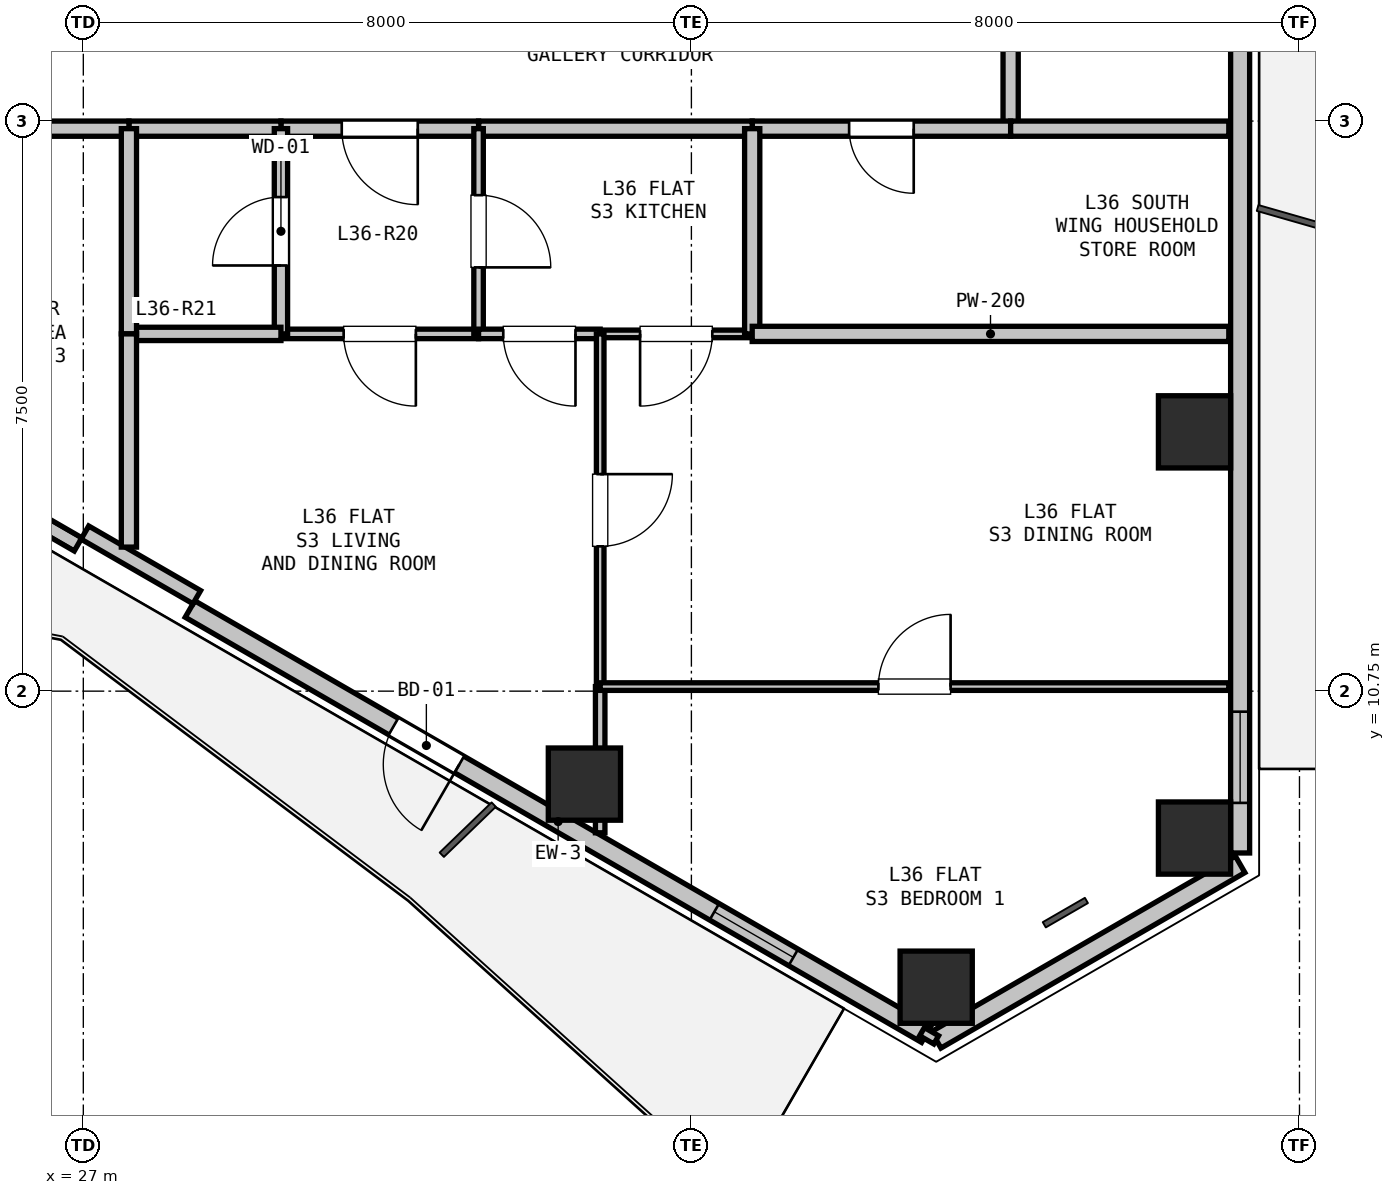
"""IFC4 building model, lengths in metres.
Left out: names, types, materials, properties, quantities, classifications, styles, units other than length and angle.
Written with IfcOpenShell. Run it as: python <this file> out.ifc"""

import sys

from ifc_helpers import new_model, si_unit, direction, frame, frame_2d, origin, origin_2d, place, context, subcontext, project, spatial, rectangle, hollow_rectangle, extrude, element, fill, save


model = new_model("IFC4")
c1 = context("Model", 3, precision=1e-05, world=origin(), true_north=direction((0.0, 1.0)))
c2 = subcontext(c1, "Body", "Model", "MODEL_VIEW")
j1 = project(units=[si_unit("LENGTHUNIT", "METRE"), si_unit("PLANEANGLEUNIT", "RADIAN")], contexts=[c1])
p1 = place(None, origin())
s1 = spatial("IfcSite", under=j1, at=p1, CompositionType="ELEMENT")
p2 = place(p1, origin())
s2 = spatial("IfcBuilding", under=s1, at=p2, CompositionType="ELEMENT")
p3 = place(p2, frame((0.0, 0.0, 131.1)))
s3 = spatial("IfcBuildingStorey", under=s2, at=p3, CompositionType="ELEMENT", Elevation=131.1)
for number, where, z_axis, x_axis in (
    (1, (41.619, 14.161, 0.0), (0.0, 0.0, 1.0), (1.0, 0.0, 0.0)),
    (2, (41.619, 8.817, 0.0), (0.0, 0.0, 1.0), (1.0, 0.0, 0.0)),
    (3, (38.22, 6.855, 0.0), (0.0, 0.0, 1.0), (1.0, 0.0, 0.0)),
    (4, (33.593, 9.527, 0.0), (0.0, 0.0, 1.0), (1.0, 0.0, 0.0)),
):
    element("IfcColumn", number, at=place(p3, frame(where, z_axis=z_axis, x_axis=x_axis)), inside=s3, PredefinedType="COLUMN", context=c2, shape_type="SweptSolid", body=[
        extrude(hollow_rectangle(XDim=0.95, YDim=0.95, WallThickness=0.028, at=origin_2d()), origin(), (0.0, 0.0, 1.0), 3.3),
    ])
p4 = place(p3, frame((42.219, 8.471, 0.0), z_axis=(0.0, 0.0, 1.0), x_axis=(-0.866035021055, -0.499983342029, 0.0)))
e5 = element("IfcWall", 5, at=p4, inside=s3, PredefinedType="SOLIDWALL", context=c2, shape_type="SweptSolid", body=[
    extrude(rectangle(XDim=4.617, YDim=0.25, at=frame_2d((2.309, 0.0))), origin(), (0.0, 0.0, 1.0), 2.68),
])
p5 = place(p3, frame((42.219, 19.807, 0.0), z_axis=(0.0, 0.0, 1.0), x_axis=(0.0, -1.0, 0.0)))
e6 = element("IfcWall", 6, at=p5, inside=s3, PredefinedType="SOLIDWALL", context=c2, shape_type="SweptSolid", body=[
    extrude(rectangle(XDim=11.186, YDim=0.25, at=frame_2d((5.593, 0.0))), origin(), (0.0, 0.0, 1.0), 2.68),
])
p6 = place(p5, frame((9.327, 0.0, 0.9)))
e7 = element("IfcOpeningElement", 7, at=p6, cuts=e6, PredefinedType="OPENING", context=c2, shape_type="SweptSolid", body=[
    extrude(rectangle(XDim=1.2, YDim=1.4, at=frame_2d((0.6, 0.7))), frame((0.0, 0.135, 0.0), z_axis=(0.0, -1.0, 0.0), x_axis=(1.0, 0.0, 0.0)), (0.0, 0.0, 1.0), 0.27),
])
p7 = place(p3, frame((38.091, 6.237, 0.0), z_axis=(0.0, 0.0, 1.0), x_axis=(-0.86602239209, 0.500005216371, 0.0)))
e8 = element("IfcWall", 8, at=p7, inside=s3, PredefinedType="SOLIDWALL", context=c2, shape_type="SweptSolid", body=[
    extrude(rectangle(XDim=11.186, YDim=0.25, at=frame_2d((5.593, 0.0))), origin(), (0.0, 0.0, 1.0), 2.68),
])
p8 = place(p7, frame((7.095, 0.0, 0.0)))
e9 = element("IfcOpeningElement", 9, at=p8, cuts=e8, PredefinedType="OPENING", context=c2, shape_type="SweptSolid", body=[
    extrude(rectangle(XDim=1.0, YDim=2.1, at=frame_2d((0.5, 1.05))), frame((0.0, 0.135, 0.0), z_axis=(0.0, -1.0, 0.0), x_axis=(1.0, 0.0, 0.0)), (0.0, 0.0, 1.0), 0.27),
])
p9 = place(p7, frame((2.02, 0.0, 0.9)))
e10 = element("IfcOpeningElement", 10, at=p9, cuts=e8, PredefinedType="OPENING", context=c2, shape_type="SweptSolid", body=[
    extrude(rectangle(XDim=1.2, YDim=1.4, at=frame_2d((0.6, 0.7))), frame((0.0, 0.135, 0.0), z_axis=(0.0, -1.0, 0.0), x_axis=(1.0, 0.0, 0.0)), (0.0, 0.0, 1.0), 0.27),
])
p10 = place(p3, frame((26.931, 12.68, 0.0), z_axis=(0.0, 0.0, 1.0), x_axis=(-0.866026619769, 0.499997893847, 0.0)))
e11 = element("IfcWall", 11, at=p10, inside=s3, PredefinedType="PARAPET", context=c2, shape_type="SweptSolid", body=[
    extrude(rectangle(XDim=10.486, YDim=0.2, at=frame_2d((5.243, 0.0))), origin(), (0.0, 0.0, 1.0), 0.2),
])
p11 = place(p3, frame((28.493, 11.986, 0.0), z_axis=(0.0, 0.0, 1.0), x_axis=(-0.86605165483, 0.499954529098, 0.0)))
e12 = element("IfcWall", 12, at=p11, inside=s3, PredefinedType="PARAPET", context=c2, shape_type="SweptSolid", body=[
    extrude(rectangle(XDim=1.7, YDim=0.2, at=frame_2d((0.85, 0.0))), origin(), (0.0, 0.0, 1.0), 2.68),
])
p12 = place(p3, frame((39.2, 19.9, 0.0), z_axis=(0.0, 0.0, 1.0), x_axis=(0.0, -1.0, 0.0)))
e13 = element("IfcWall", 13, at=p12, inside=s3, PredefinedType="PARTITIONING", context=c2, shape_type="SweptSolid", body=[
    extrude(rectangle(XDim=1.75, YDim=0.2, at=frame_2d((0.875, 0.0))), origin(), (0.0, 0.0, 1.0), 3.06),
])
p13 = place(p3, frame((39.2, 18.15, 0.0), z_axis=(0.0, 0.0, 1.0), x_axis=(-1.0, 0.0, 0.0)))
e14 = element("IfcWall", 14, at=p13, inside=s3, PredefinedType="PARTITIONING", context=c2, shape_type="SweptSolid", body=[
    extrude(rectangle(XDim=3.4, YDim=0.2, at=frame_2d((1.7, 0.0))), origin(), (0.0, 0.0, 1.0), 2.433),
])
p14 = place(p13, frame((1.275, 0.0, 0.0)))
e15 = element("IfcOpeningElement", 15, at=p14, cuts=e14, PredefinedType="OPENING", context=c2, shape_type="SweptSolid", body=[
    extrude(rectangle(XDim=0.85, YDim=2.1, at=frame_2d((0.425, 1.05))), frame((0.0, 0.11, 0.0), z_axis=(0.0, -1.0, 0.0), x_axis=(1.0, 0.0, 0.0)), (0.0, 0.0, 1.0), 0.22),
])
p15 = place(p3, frame((35.8, 18.15, 0.0), z_axis=(0.0, 0.0, 1.0), x_axis=(-1.0, 0.0, 0.0)))
e16 = element("IfcWall", 16, at=p15, inside=s3, PredefinedType="PARTITIONING", context=c2, shape_type="SweptSolid", body=[
    extrude(rectangle(XDim=3.6, YDim=0.2, at=frame_2d((1.8, 0.0))), origin(), (0.0, 0.0, 1.0), 3.06),
])
p16 = place(p3, frame((32.2, 18.15, 0.0), z_axis=(0.0, 0.0, 1.0), x_axis=(-1.0, 0.0, 0.0)))
e17 = element("IfcWall", 17, at=p16, inside=s3, PredefinedType="PARTITIONING", context=c2, shape_type="SweptSolid", body=[
    extrude(rectangle(XDim=2.6, YDim=0.2, at=frame_2d((1.3, 0.0))), origin(), (0.0, 0.0, 1.0), 3.06),
])
p17 = place(p16, frame((0.8, 0.0, 0.0)))
e18 = element("IfcOpeningElement", 18, at=p17, cuts=e17, PredefinedType="OPENING", context=c2, shape_type="SweptSolid", body=[
    extrude(rectangle(XDim=1.0, YDim=2.15, at=frame_2d((0.5, 1.075))), frame((0.0, 0.11, 0.0), z_axis=(0.0, -1.0, 0.0), x_axis=(1.0, 0.0, 0.0)), (0.0, 0.0, 1.0), 0.22),
])
p18 = place(p3, frame((29.6, 18.15, 0.0), z_axis=(0.0, 0.0, 1.0), x_axis=(-1.0, 0.0, 0.0)))
e19 = element("IfcWall", 19, at=p18, inside=s3, PredefinedType="PARTITIONING", context=c2, shape_type="SweptSolid", body=[
    extrude(rectangle(XDim=2.0, YDim=0.2, at=frame_2d((1.0, 0.0))), origin(), (0.0, 0.0, 1.0), 3.06),
])
p19 = place(p3, frame((27.6, 18.15, 0.0), z_axis=(0.0, 0.0, 1.0), x_axis=(-1.0, 0.0, 0.0)))
e20 = element("IfcWall", 20, at=p19, inside=s3, PredefinedType="PARTITIONING", context=c2, shape_type="SweptSolid", body=[
    extrude(rectangle(XDim=3.2, YDim=0.2, at=frame_2d((1.6, 0.0))), origin(), (0.0, 0.0, 1.0), 2.433),
])
p20 = place(p19, frame((1.1, 0.0, 0.0)))
e21 = element("IfcOpeningElement", 21, at=p20, cuts=e20, PredefinedType="OPENING", context=c2, shape_type="SweptSolid", body=[
    extrude(rectangle(XDim=1.0, YDim=2.15, at=frame_2d((0.5, 1.075))), frame((0.0, 0.11, 0.0), z_axis=(0.0, -1.0, 0.0), x_axis=(1.0, 0.0, 0.0)), (0.0, 0.0, 1.0), 0.22),
])
p21 = place(p3, frame((32.2, 15.45, 0.0), z_axis=(0.0, 0.0, 1.0), x_axis=(-1.0, 0.0, 0.0)))
e22 = element("IfcWall", 22, at=p21, inside=s3, PredefinedType="PARTITIONING", context=c2, shape_type="SweptSolid", body=[
    extrude(rectangle(XDim=2.6, YDim=0.125, at=frame_2d((1.3, 0.0))), origin(), (0.0, 0.0, 1.0), 3.06),
])
p22 = place(p21, frame((0.825, 0.0, 0.0)))
e23 = element("IfcOpeningElement", 23, at=p22, cuts=e22, PredefinedType="OPENING", context=c2, shape_type="SweptSolid", body=[
    extrude(rectangle(XDim=0.95, YDim=2.1, at=frame_2d((0.475, 1.05))), frame((0.0, 0.073, 0.0), z_axis=(0.0, -1.0, 0.0), x_axis=(1.0, 0.0, 0.0)), (0.0, 0.0, 1.0), 0.145),
])
p23 = place(p3, frame((29.6, 15.45, 0.0), z_axis=(0.0, 0.0, 1.0), x_axis=(0.0, 1.0, 0.0)))
e24 = element("IfcWall", 24, at=p23, inside=s3, PredefinedType="PLUMBINGWALL", context=c2, shape_type="SweptSolid", body=[
    extrude(rectangle(XDim=2.7, YDim=0.175, at=frame_2d((1.35, 0.0))), origin(), (0.0, 0.0, 1.0), 3.06),
])
p24 = place(p23, frame((0.9, 0.0, 0.0)))
e25 = element("IfcOpeningElement", 25, at=p24, cuts=e24, PredefinedType="OPENING", context=c2, shape_type="SweptSolid", body=[
    extrude(rectangle(XDim=0.9, YDim=2.1, at=frame_2d((0.45, 1.05))), frame((0.0, 0.097, 0.0), z_axis=(0.0, -1.0, 0.0), x_axis=(1.0, 0.0, 0.0)), (0.0, 0.0, 1.0), 0.195),
])
p25 = place(p3, frame((32.2, 18.15, 0.0), z_axis=(0.0, 0.0, 1.0), x_axis=(0.0, -1.0, 0.0)))
e26 = element("IfcWall", 26, at=p25, inside=s3, PredefinedType="PARTITIONING", context=c2, shape_type="SweptSolid", body=[
    extrude(rectangle(XDim=2.7, YDim=0.125, at=frame_2d((1.35, 0.0))), origin(), (0.0, 0.0, 1.0), 3.06),
])
p26 = place(p25, frame((0.875, 0.0, 0.0)))
e27 = element("IfcOpeningElement", 27, at=p26, cuts=e26, PredefinedType="OPENING", context=c2, shape_type="SweptSolid", body=[
    extrude(rectangle(XDim=0.95, YDim=2.1, at=frame_2d((0.475, 1.05))), frame((0.0, 0.073, 0.0), z_axis=(0.0, -1.0, 0.0), x_axis=(1.0, 0.0, 0.0)), (0.0, 0.0, 1.0), 0.145),
])
p27 = place(p3, frame((29.6, 15.45, 0.0), z_axis=(0.0, 0.0, 1.0), x_axis=(-1.0, 0.0, 0.0)))
e28 = element("IfcWall", 28, at=p27, inside=s3, PredefinedType="PLUMBINGWALL", context=c2, shape_type="SweptSolid", body=[
    extrude(rectangle(XDim=2.0, YDim=0.175, at=frame_2d((1.0, 0.0))), origin(), (0.0, 0.0, 1.0), 3.06),
])
p28 = place(p3, frame((27.6, 15.45, 0.0), z_axis=(0.0, 0.0, 1.0), x_axis=(0.0, 1.0, 0.0)))
e29 = element("IfcWall", 29, at=p28, inside=s3, PredefinedType="PARTITIONING", context=c2, shape_type="SweptSolid", body=[
    extrude(rectangle(XDim=2.7, YDim=0.2, at=frame_2d((1.35, 0.0))), origin(), (0.0, 0.0, 1.0), 3.06),
])
p29 = place(p3, frame((35.8, 15.45, 0.0), z_axis=(0.0, 0.0, 1.0), x_axis=(-1.0, 0.0, 0.0)))
e30 = element("IfcWall", 30, at=p29, inside=s3, PredefinedType="PARTITIONING", context=c2, shape_type="SweptSolid", body=[
    extrude(rectangle(XDim=2.0, YDim=0.1, at=frame_2d((1.0, 0.0))), origin(), (0.0, 0.0, 1.0), 3.06),
])
p30 = place(p29, frame((0.525, 0.0, 0.0)))
e31 = element("IfcOpeningElement", 31, at=p30, cuts=e30, PredefinedType="OPENING", context=c2, shape_type="SweptSolid", body=[
    extrude(rectangle(XDim=0.95, YDim=2.1, at=frame_2d((0.475, 1.05))), frame((0.0, 0.06, 0.0), z_axis=(0.0, -1.0, 0.0), x_axis=(1.0, 0.0, 0.0)), (0.0, 0.0, 1.0), 0.12),
])
p31 = place(p3, frame((33.8, 15.45, 0.0), z_axis=(0.0, 0.0, 1.0), x_axis=(-1.0, 0.0, 0.0)))
e32 = element("IfcWall", 32, at=p31, inside=s3, PredefinedType="PARTITIONING", context=c2, shape_type="SweptSolid", body=[
    extrude(rectangle(XDim=1.6, YDim=0.125, at=frame_2d((0.8, 0.0))), origin(), (0.0, 0.0, 1.0), 3.06),
])
p32 = place(p31, frame((0.325, 0.0, 0.0)))
e33 = element("IfcOpeningElement", 33, at=p32, cuts=e32, PredefinedType="OPENING", context=c2, shape_type="SweptSolid", body=[
    extrude(rectangle(XDim=0.95, YDim=2.1, at=frame_2d((0.475, 1.05))), frame((0.0, 0.073, 0.0), z_axis=(0.0, -1.0, 0.0), x_axis=(1.0, 0.0, 0.0)), (0.0, 0.0, 1.0), 0.145),
])
p33 = place(p3, frame((35.8, 18.15, 0.0), z_axis=(0.0, 0.0, 1.0), x_axis=(0.0, -1.0, 0.0)))
e34 = element("IfcWall", 34, at=p33, inside=s3, PredefinedType="PARTITIONING", context=c2, shape_type="SweptSolid", body=[
    extrude(rectangle(XDim=2.7, YDim=0.2, at=frame_2d((1.35, 0.0))), origin(), (0.0, 0.0, 1.0), 3.06),
])
p34 = place(p3, frame((39.2, 18.15, 0.0), z_axis=(0.0, 0.0, 1.0), x_axis=(1.0, 0.0, 0.0)))
e35 = element("IfcWall", 35, at=p34, inside=s3, PredefinedType="PARTITIONING", context=c2, shape_type="SweptSolid", body=[
    extrude(rectangle(XDim=2.87, YDim=0.2, at=frame_2d((1.435, 0.0))), origin(), (0.0, 0.0, 1.0), 2.365),
])
p35 = place(p3, frame((42.07, 15.45, 0.0), z_axis=(0.0, 0.0, 1.0), x_axis=(-1.0, 0.0, 0.0)))
e36 = element("IfcWall", 36, at=p35, inside=s3, PredefinedType="PARTITIONING", context=c2, shape_type="SweptSolid", body=[
    extrude(rectangle(XDim=6.27, YDim=0.2, at=frame_2d((3.135, 0.0))), origin(), (0.0, 0.0, 1.0), 2.365),
])
p36 = place(p3, frame((27.6, 15.45, 0.0), z_axis=(0.0, 0.0, 1.0), x_axis=(0.0, -1.0, 0.0)))
e37 = element("IfcWall", 37, at=p36, inside=s3, PredefinedType="PARTITIONING", context=c2, shape_type="SweptSolid", body=[
    extrude(rectangle(XDim=2.805, YDim=0.2, at=frame_2d((1.402, 0.0))), origin(), (0.0, 0.0, 1.0), 2.365),
])
p37 = place(p3, frame((33.8, 15.45, 0.0), z_axis=(0.0, 0.0, 1.0), x_axis=(0.0, -1.0, 0.0)))
e38 = element("IfcWall", 38, at=p37, inside=s3, PredefinedType="PARTITIONING", context=c2, shape_type="SweptSolid", body=[
    extrude(rectangle(XDim=4.64, YDim=0.1, at=frame_2d((2.32, 0.0))), origin(), (0.0, 0.0, 1.0), 3.06),
])
p38 = place(p37, frame((1.845, 0.0, 0.0)))
e39 = element("IfcOpeningElement", 39, at=p38, cuts=e38, PredefinedType="OPENING", context=c2, shape_type="SweptSolid", body=[
    extrude(rectangle(XDim=0.95, YDim=2.1, at=frame_2d((0.475, 1.05))), frame((0.0, 0.06, 0.0), z_axis=(0.0, -1.0, 0.0), x_axis=(1.0, 0.0, 0.0)), (0.0, 0.0, 1.0), 0.12),
])
p39 = place(p3, frame((33.8, 10.81, 0.0), z_axis=(0.0, 0.0, 1.0), x_axis=(0.0, -1.0, 0.0)))
e40 = element("IfcWall", 40, at=p39, inside=s3, PredefinedType="PARTITIONING", context=c2, shape_type="SweptSolid", body=[
    extrude(rectangle(XDim=1.923, YDim=0.125, at=frame_2d((0.962, 0.0))), origin(), (0.0, 0.0, 1.0), 3.06),
])
p40 = place(p3, frame((33.8, 10.81, 0.0), z_axis=(0.0, 0.0, 1.0), x_axis=(1.0, 0.0, 0.0)))
e41 = element("IfcWall", 41, at=p40, inside=s3, PredefinedType="PARTITIONING", context=c2, shape_type="SweptSolid", body=[
    extrude(rectangle(XDim=8.27, YDim=0.1, at=frame_2d((4.135, 0.0))), origin(), (0.0, 0.0, 1.0), 2.433),
])
p41 = place(p40, frame((3.66, 0.0, 0.0)))
e42 = element("IfcOpeningElement", 42, at=p41, cuts=e41, PredefinedType="OPENING", context=c2, shape_type="SweptSolid", body=[
    extrude(rectangle(XDim=0.95, YDim=2.1, at=frame_2d((0.475, 1.05))), frame((0.0, 0.06, 0.0), z_axis=(0.0, -1.0, 0.0), x_axis=(1.0, 0.0, 0.0)), (0.0, 0.0, 1.0), 0.12),
])
p42 = place(p3, frame((38.221, 6.162, 0.0), z_axis=(0.0, 0.0, 1.0), x_axis=(-0.865581379588, 0.500768285049, 0.0)))
e43 = element("IfcWall", 43, at=p42, inside=s3, PredefinedType="PARTITIONING", context=c2, shape_type="SweptSolid", body=[
    extrude(rectangle(XDim=0.216, YDim=0.125, at=frame_2d((0.108, 0.0))), origin(), (0.0, 0.0, 1.0), 3.06),
])
p43 = place(p6, origin())
e44 = element("IfcWindow", 44, at=p43, inside=s3, PartitioningType="SINGLE_PANEL", PredefinedType="WINDOW", context=c2, shape_type="SweptSolid", body=[
    extrude(rectangle(XDim=1.2, YDim=1.4, at=frame_2d((0.6, 0.7))), frame((0.0, 0.03, 0.0), z_axis=(0.0, -1.0, 0.0), x_axis=(1.0, 0.0, 0.0)), (0.0, 0.0, 1.0), 0.06),
])
fill(e7, e44)
p44 = place(p8, origin())
e45 = element("IfcDoor", 45, at=p44, inside=s3, OperationType="SINGLE_SWING_LEFT", PredefinedType="DOOR", context=c2, shape_type="SweptSolid", body=[
    extrude(rectangle(XDim=1.0, YDim=2.1, at=frame_2d((0.5, 1.05))), frame((0.0, 0.025, 0.0), z_axis=(0.0, -1.0, 0.0), x_axis=(1.0, 0.0, 0.0)), (0.0, 0.0, 1.0), 0.05),
])
fill(e9, e45)
p45 = place(p9, origin())
e46 = element("IfcWindow", 46, at=p45, inside=s3, PartitioningType="SINGLE_PANEL", PredefinedType="WINDOW", context=c2, shape_type="SweptSolid", body=[
    extrude(rectangle(XDim=1.2, YDim=1.4, at=frame_2d((0.6, 0.7))), frame((0.0, 0.03, 0.0), z_axis=(0.0, -1.0, 0.0), x_axis=(1.0, 0.0, 0.0)), (0.0, 0.0, 1.0), 0.06),
])
fill(e10, e46)
p46 = place(p17, origin())
e47 = element("IfcDoor", 47, at=p46, inside=s3, OperationType="SINGLE_SWING_LEFT", PredefinedType="DOOR", context=c2, shape_type="SweptSolid", body=[
    extrude(rectangle(XDim=1.0, YDim=2.15, at=frame_2d((0.5, 1.075))), frame((0.0, 0.025, 0.0), z_axis=(0.0, -1.0, 0.0), x_axis=(1.0, 0.0, 0.0)), (0.0, 0.0, 1.0), 0.05),
])
fill(e18, e47)
p47 = place(p14, origin())
e48 = element("IfcDoor", 48, at=p47, inside=s3, OperationType="SINGLE_SWING_LEFT", PredefinedType="DOOR", context=c2, shape_type="SweptSolid", body=[
    extrude(rectangle(XDim=0.85, YDim=2.1, at=frame_2d((0.425, 1.05))), frame((0.0, 0.025, 0.0), z_axis=(0.0, -1.0, 0.0), x_axis=(1.0, 0.0, 0.0)), (0.0, 0.0, 1.0), 0.05),
])
fill(e15, e48)
p48 = place(p24, origin())
e49 = element("IfcDoor", 49, at=p48, inside=s3, OperationType="SINGLE_SWING_LEFT", PredefinedType="DOOR", context=c2, shape_type="SweptSolid", body=[
    extrude(rectangle(XDim=0.9, YDim=2.1, at=frame_2d((0.45, 1.05))), frame((0.0, 0.025, 0.0), z_axis=(0.0, -1.0, 0.0), x_axis=(1.0, 0.0, 0.0)), (0.0, 0.0, 1.0), 0.05),
])
fill(e25, e49)
p49 = place(p26, origin())
e50 = element("IfcDoor", 50, at=p49, inside=s3, OperationType="SINGLE_SWING_RIGHT", PredefinedType="DOOR", context=c2, shape_type="SweptSolid", body=[
    extrude(rectangle(XDim=0.95, YDim=2.1, at=frame_2d((0.475, 1.05))), frame((0.0, 0.025, 0.0), z_axis=(0.0, -1.0, 0.0), x_axis=(1.0, 0.0, 0.0)), (0.0, 0.0, 1.0), 0.05),
])
fill(e27, e50)
p50 = place(p22, origin())
e51 = element("IfcDoor", 51, at=p50, inside=s3, OperationType="SINGLE_SWING_LEFT", PredefinedType="DOOR", context=c2, shape_type="SweptSolid", body=[
    extrude(rectangle(XDim=0.95, YDim=2.1, at=frame_2d((0.475, 1.05))), frame((0.0, 0.025, 0.0), z_axis=(0.0, -1.0, 0.0), x_axis=(1.0, 0.0, 0.0)), (0.0, 0.0, 1.0), 0.05),
])
fill(e23, e51)
p51 = place(p32, origin())
e52 = element("IfcDoor", 52, at=p51, inside=s3, OperationType="SINGLE_SWING_LEFT", PredefinedType="DOOR", context=c2, shape_type="SweptSolid", body=[
    extrude(rectangle(XDim=0.95, YDim=2.1, at=frame_2d((0.475, 1.05))), frame((0.0, 0.025, 0.0), z_axis=(0.0, -1.0, 0.0), x_axis=(1.0, 0.0, 0.0)), (0.0, 0.0, 1.0), 0.05),
])
fill(e33, e52)
p52 = place(p30, origin())
e53 = element("IfcDoor", 53, at=p52, inside=s3, OperationType="SINGLE_SWING_RIGHT", PredefinedType="DOOR", context=c2, shape_type="SweptSolid", body=[
    extrude(rectangle(XDim=0.95, YDim=2.1, at=frame_2d((0.475, 1.05))), frame((0.0, 0.025, 0.0), z_axis=(0.0, -1.0, 0.0), x_axis=(1.0, 0.0, 0.0)), (0.0, 0.0, 1.0), 0.05),
])
fill(e31, e53)
p53 = place(p38, origin())
e54 = element("IfcDoor", 54, at=p53, inside=s3, OperationType="SINGLE_SWING_LEFT", PredefinedType="DOOR", context=c2, shape_type="SweptSolid", body=[
    extrude(rectangle(XDim=0.95, YDim=2.1, at=frame_2d((0.475, 1.05))), frame((0.0, 0.025, 0.0), z_axis=(0.0, -1.0, 0.0), x_axis=(1.0, 0.0, 0.0)), (0.0, 0.0, 1.0), 0.05),
])
fill(e39, e54)
p54 = place(p41, origin())
e55 = element("IfcDoor", 55, at=p54, inside=s3, OperationType="SINGLE_SWING_RIGHT", PredefinedType="DOOR", context=c2, shape_type="SweptSolid", body=[
    extrude(rectangle(XDim=0.95, YDim=2.1, at=frame_2d((0.475, 1.05))), frame((0.0, 0.025, 0.0), z_axis=(0.0, -1.0, 0.0), x_axis=(1.0, 0.0, 0.0)), (0.0, 0.0, 1.0), 0.05),
])
fill(e42, e55)
save(model, sys.argv[1])
